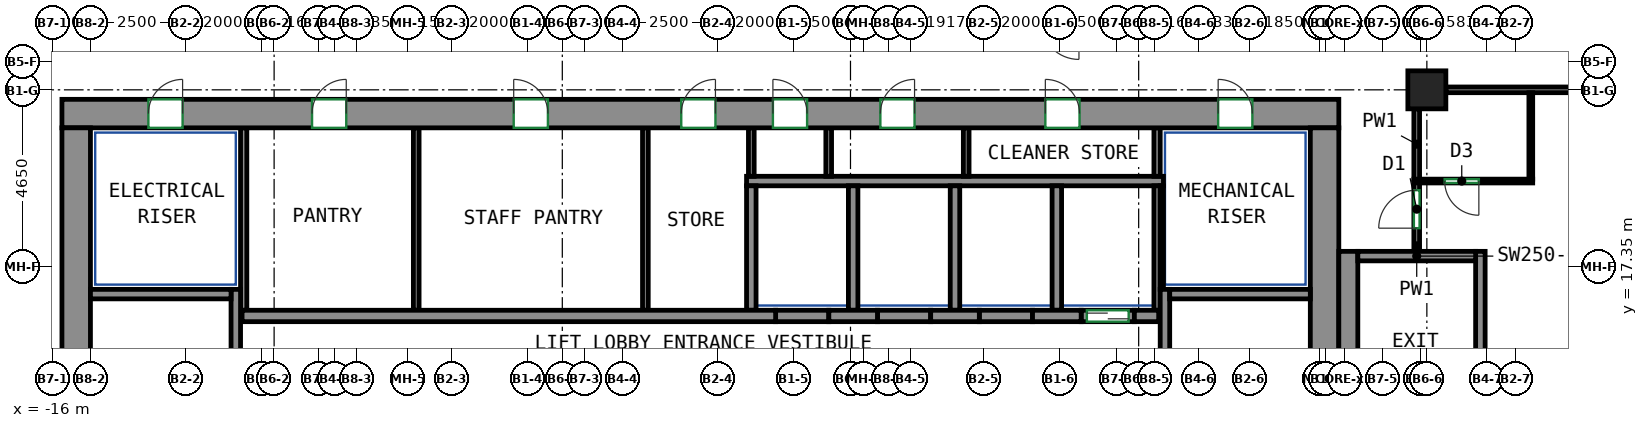
"""IFC4 building model, lengths in metres.
Left out: names, types, materials, properties, quantities, classifications, styles, units other than length and angle.
Written with IfcOpenShell. Run it as: python <this file> out.ifc"""

import sys

from ifc_helpers import new_model, si_unit, direction, frame, frame_2d, origin, origin_2d, place, context, subcontext, project, spatial, rectangle, extrude, source, transform, mapped, element, fill, save


model = new_model("IFC4")
c1 = context("Model", 3, precision=1e-05, world=origin(), true_north=direction((0.0, 1.0)))
c2 = subcontext(c1, "Body", "Model", "MODEL_VIEW")
j1 = project(units=[si_unit("LENGTHUNIT", "METRE"), si_unit("PLANEANGLEUNIT", "RADIAN")], contexts=[c1])
p1 = place(None, origin())
s1 = spatial("IfcSite", under=j1, at=p1, CompositionType="ELEMENT")
p2 = place(p1, origin())
s2 = spatial("IfcBuilding", under=s1, at=p2, CompositionType="ELEMENT")
p3 = place(p2, frame((0.0, 0.0, 213.5)))
s3 = spatial("IfcBuildingStorey", under=s2, at=p3, CompositionType="ELEMENT", Elevation=213.5)
m1 = source(origin(), c2, "Body", "SweptSolid", [
    extrude(rectangle(XDim=1.0, YDim=1.0, at=origin_2d()), origin(), (0.0, 0.0, 1.0), 3.12),
])
p4 = place(p3, frame((20.167, 22.0, 0.0), z_axis=(0.0, 0.0, 1.0), x_axis=(1.0, 0.0, 0.0)))
e1 = element("IfcColumn", 1, at=p4, inside=s3, PredefinedType="COLUMN", context=c2, shape_type="MappedRepresentation", body=[
    mapped(m1, transform((0.0, 0.0, 0.0))),
])
m2 = source(origin(), c2, "Body", "SweptSolid", [
    extrude(rectangle(XDim=33.6, YDim=0.75, at=frame_2d((16.8, 0.0))), origin(), (0.0, 0.0, 1.0), 3.12),
])
p5 = place(p3, frame((-15.75, 21.375, 0.0), z_axis=(0.0, 0.0, 1.0), x_axis=(1.0, 0.0, 0.0)))
e2 = element("IfcWall", 2, at=p5, inside=s3, PredefinedType="SHEAR", context=c2, shape_type="MappedRepresentation", body=[
    mapped(m2, transform((0.0, 0.0, 0.0))),
])
p6 = place(p5, frame((6.581, 0.0, 0.0)))
e3 = element("IfcOpeningElement", 3, at=p6, cuts=e2, PredefinedType="OPENING", context=c2, shape_type="SweptSolid", body=[
    extrude(rectangle(XDim=0.9, YDim=2.1, at=frame_2d((0.45, 1.05))), frame((0.0, 0.385, 0.0), z_axis=(0.0, -1.0, 0.0), x_axis=(1.0, 0.0, 0.0)), (0.0, 0.0, 1.0), 0.77),
])
p7 = place(p5, frame((11.888, 0.0, 0.0)))
e4 = element("IfcOpeningElement", 4, at=p7, cuts=e2, PredefinedType="OPENING", context=c2, shape_type="SweptSolid", body=[
    extrude(rectangle(XDim=0.9, YDim=2.1, at=frame_2d((0.45, 1.05))), frame((0.0, 0.385, 0.0), z_axis=(0.0, -1.0, 0.0), x_axis=(1.0, 0.0, 0.0)), (0.0, 0.0, 1.0), 0.77),
])
p8 = place(p5, frame((16.296, 0.0, 0.0)))
e5 = element("IfcOpeningElement", 5, at=p8, cuts=e2, PredefinedType="OPENING", context=c2, shape_type="SweptSolid", body=[
    extrude(rectangle(XDim=0.9, YDim=2.1, at=frame_2d((0.45, 1.05))), frame((0.0, 0.385, 0.0), z_axis=(0.0, -1.0, 0.0), x_axis=(1.0, 0.0, 0.0)), (0.0, 0.0, 1.0), 0.77),
])
p9 = place(p5, frame((18.708, 0.0, 0.0)))
e6 = element("IfcOpeningElement", 6, at=p9, cuts=e2, PredefinedType="OPENING", context=c2, shape_type="SweptSolid", body=[
    extrude(rectangle(XDim=0.9, YDim=2.1, at=frame_2d((0.45, 1.05))), frame((0.0, 0.385, 0.0), z_axis=(0.0, -1.0, 0.0), x_axis=(1.0, 0.0, 0.0)), (0.0, 0.0, 1.0), 0.77),
])
p10 = place(p5, frame((21.536, 0.0, 0.0)))
e7 = element("IfcOpeningElement", 7, at=p10, cuts=e2, PredefinedType="OPENING", context=c2, shape_type="SweptSolid", body=[
    extrude(rectangle(XDim=0.9, YDim=2.1, at=frame_2d((0.45, 1.05))), frame((0.0, 0.385, 0.0), z_axis=(0.0, -1.0, 0.0), x_axis=(1.0, 0.0, 0.0)), (0.0, 0.0, 1.0), 0.77),
])
p11 = place(p5, frame((25.877, 0.0, 0.0)))
e8 = element("IfcOpeningElement", 8, at=p11, cuts=e2, PredefinedType="OPENING", context=c2, shape_type="SweptSolid", body=[
    extrude(rectangle(XDim=0.9, YDim=2.1, at=frame_2d((0.45, 1.05))), frame((0.0, 0.385, 0.0), z_axis=(0.0, -1.0, 0.0), x_axis=(1.0, 0.0, 0.0)), (0.0, 0.0, 1.0), 0.77),
])
p12 = place(p5, frame((2.275, 0.0, 0.0)))
e9 = element("IfcOpeningElement", 9, at=p12, cuts=e2, PredefinedType="OPENING", context=c2, shape_type="SweptSolid", body=[
    extrude(rectangle(XDim=0.9, YDim=2.1, at=frame_2d((0.45, 1.05))), frame((0.0, 0.385, 0.0), z_axis=(0.0, -1.0, 0.0), x_axis=(1.0, 0.0, 0.0)), (0.0, 0.0, 1.0), 0.77),
])
p13 = place(p5, frame((30.425, 0.0, 0.0)))
e10 = element("IfcOpeningElement", 10, at=p13, cuts=e2, PredefinedType="OPENING", context=c2, shape_type="SweptSolid", body=[
    extrude(rectangle(XDim=0.9, YDim=2.1, at=frame_2d((0.45, 1.05))), frame((0.0, 0.385, 0.0), z_axis=(0.0, -1.0, 0.0), x_axis=(1.0, 0.0, 0.0)), (0.0, 0.0, 1.0), 0.77),
])
m3 = source(origin(), c2, "Body", "SweptSolid", [
    extrude(rectangle(XDim=12.0, YDim=0.75, at=frame_2d((6.0, 0.0))), origin(), (0.0, 0.0, 1.0), 3.12),
])
for number, where, z_axis, x_axis in (
    (11, (-15.375, 9.0, 0.0), (0.0, 0.0, 1.0), (0.0, 1.0, 0.0)),
    (12, (17.475, 9.0, 0.0), (0.0, 0.0, 1.0), (0.0, 1.0, 0.0)),
):
    element("IfcWall", number, at=place(p3, frame(where, z_axis=z_axis, x_axis=x_axis)), inside=s3, PredefinedType="SHEAR", context=c2, shape_type="MappedRepresentation", body=[
        mapped(m3, transform((0.0, 0.0, 0.0))),
    ])
m4 = source(origin(), c2, "Body", "SweptSolid", [
    extrude(rectangle(XDim=7.75, YDim=0.25, at=frame_2d((3.875, 0.0))), origin(), (0.0, 0.0, 1.0), 3.12),
])
p14 = place(p3, frame((-11.175, 9.0, 0.0), z_axis=(0.0, 0.0, 1.0), x_axis=(0.0, 1.0, 0.0)))
e13 = element("IfcWall", 13, at=p14, inside=s3, PredefinedType="SHEAR", context=c2, shape_type="MappedRepresentation", body=[
    mapped(m4, transform((0.0, 0.0, 0.0))),
])
m5 = source(origin(), c2, "Body", "SweptSolid", [
    extrude(rectangle(XDim=3.7, YDim=0.25, at=frame_2d((1.85, 0.0))), origin(), (0.0, 0.0, 1.0), 3.12),
])
p15 = place(p3, frame((-15.0, 16.625, 0.0), z_axis=(0.0, 0.0, 1.0), x_axis=(1.0, 0.0, 0.0)))
e14 = element("IfcWall", 14, at=p15, inside=s3, PredefinedType="SHEAR", context=c2, shape_type="MappedRepresentation", body=[
    mapped(m5, transform((0.0, 0.0, 0.0))),
])
p16 = place(p3, frame((13.275, 9.0, 0.0), z_axis=(0.0, 0.0, 1.0), x_axis=(0.0, 1.0, 0.0)))
e15 = element("IfcWall", 15, at=p16, inside=s3, PredefinedType="SHEAR", context=c2, shape_type="MappedRepresentation", body=[
    mapped(m4, transform((0.0, 0.0, 0.0))),
])
m6 = source(origin(), c2, "Body", "SweptSolid", [
    extrude(rectangle(XDim=3.7, YDim=0.25, at=frame_2d((1.85, 0.0))), origin(), (0.0, 0.0, 1.0), 3.12),
])
p17 = place(p3, frame((13.4, 16.625, 0.0), z_axis=(0.0, 0.0, 1.0), x_axis=(1.0, 0.0, 0.0)))
e16 = element("IfcWall", 16, at=p17, inside=s3, PredefinedType="SHEAR", context=c2, shape_type="MappedRepresentation", body=[
    mapped(m6, transform((0.0, 0.0, 0.0))),
])
m7 = source(origin(), c2, "Body", "SweptSolid", [
    extrude(rectangle(XDim=8.0, YDim=0.5, at=frame_2d((4.0, 0.0))), origin(), (0.0, 0.0, 1.0), 3.12),
])
p18 = place(p3, frame((18.1, 9.75, 0.0), z_axis=(0.0, 0.0, 1.0), x_axis=(0.0, 1.0, 0.0)))
e17 = element("IfcWall", 17, at=p18, inside=s3, PredefinedType="SHEAR", context=c2, shape_type="MappedRepresentation", body=[
    mapped(m7, transform((0.0, 0.0, 0.0))),
])
m8 = source(origin(), c2, "Body", "SweptSolid", [
    extrude(rectangle(XDim=8.0, YDim=0.25, at=frame_2d((4.0, 0.0))), origin(), (0.0, 0.0, 1.0), 3.12),
])
p19 = place(p3, frame((21.575, 9.75, 0.0), z_axis=(0.0, 0.0, 1.0), x_axis=(0.0, 1.0, 0.0)))
e18 = element("IfcWall", 18, at=p19, inside=s3, PredefinedType="SHEAR", context=c2, shape_type="MappedRepresentation", body=[
    mapped(m8, transform((0.0, 0.0, 0.0))),
])
m9 = source(origin(), c2, "Body", "SweptSolid", [
    extrude(rectangle(XDim=3.1, YDim=0.25, at=frame_2d((1.55, 0.0))), origin(), (0.0, 0.0, 1.0), 3.12),
])
p20 = place(p3, frame((18.35, 17.625, 0.0), z_axis=(0.0, 0.0, 1.0), x_axis=(1.0, 0.0, 0.0)))
e19 = element("IfcWall", 19, at=p20, inside=s3, PredefinedType="SHEAR", context=c2, shape_type="MappedRepresentation", body=[
    mapped(m9, transform((0.0, 0.0, 0.0))),
])
m10 = source(origin(), c2, "Body", "SweptSolid", [
    extrude(rectangle(XDim=14.04, YDim=0.3, at=frame_2d((7.02, 0.0))), origin(), (0.0, 0.0, 1.0), 3.12),
])
p21 = place(p3, frame((-11.01, 16.05, 0.0), z_axis=(0.0, 0.0, 1.0), x_axis=(1.0, 0.0, 0.0)))
e20 = element("IfcWall", 20, at=p21, inside=s3, PredefinedType="SHEAR", context=c2, shape_type="MappedRepresentation", body=[
    mapped(m10, transform((0.0, 0.0, 0.0))),
])
m11 = source(origin(), c2, "Body", "SweptSolid", [
    extrude(rectangle(XDim=1.28, YDim=0.3, at=frame_2d((0.64, 0.0))), origin(), (0.0, 0.0, 1.0), 3.12),
])
p22 = place(p3, frame((4.43, 16.05, 0.0), z_axis=(0.0, 0.0, 1.0), x_axis=(1.0, 0.0, 0.0)))
e21 = element("IfcWall", 21, at=p22, inside=s3, PredefinedType="SHEAR", context=c2, shape_type="MappedRepresentation", body=[
    mapped(m11, transform((0.0, 0.0, 0.0))),
])
m12 = source(origin(), c2, "Body", "SweptSolid", [
    extrude(rectangle(XDim=1.28, YDim=0.3, at=frame_2d((0.64, 0.0))), origin(), (0.0, 0.0, 1.0), 3.12),
])
p23 = place(p3, frame((7.11, 16.05, 0.0), z_axis=(0.0, 0.0, 1.0), x_axis=(1.0, 0.0, 0.0)))
e22 = element("IfcWall", 22, at=p23, inside=s3, PredefinedType="SHEAR", context=c2, shape_type="MappedRepresentation", body=[
    mapped(m12, transform((0.0, 0.0, 0.0))),
])
p24 = place(p3, frame((9.79, 16.05, 0.0), z_axis=(0.0, 0.0, 1.0), x_axis=(1.0, 0.0, 0.0)))
e23 = element("IfcWall", 23, at=p24, inside=s3, PredefinedType="SHEAR", context=c2, shape_type="MappedRepresentation", body=[
    mapped(m11, transform((0.0, 0.0, 0.0))),
])
m13 = source(origin(), c2, "Body", "SweptSolid", [
    extrude(rectangle(XDim=0.64, YDim=0.3, at=frame_2d((0.32, 0.0))), origin(), (0.0, 0.0, 1.0), 3.12),
])
p25 = place(p3, frame((12.47, 16.05, 0.0), z_axis=(0.0, 0.0, 1.0), x_axis=(1.0, 0.0, 0.0)))
e24 = element("IfcWall", 24, at=p25, inside=s3, PredefinedType="SHEAR", context=c2, shape_type="MappedRepresentation", body=[
    mapped(m13, transform((0.0, 0.0, 0.0))),
])
m14 = source(origin(), c2, "Body", "SweptSolid", [
    extrude(rectangle(XDim=1.4, YDim=0.3, at=frame_2d((0.7, 0.0))), origin(), (0.0, 0.0, 1.0), 3.12),
])
p26 = place(p3, frame((11.07, 16.05, 0.0), z_axis=(0.0, 0.0, 1.0), x_axis=(1.0, 0.0, 0.0)))
e25 = element("IfcWall", 25, at=p26, inside=s3, PredefinedType="PARTITIONING", context=c2, shape_type="MappedRepresentation", body=[
    mapped(m14, transform((0.0, 0.0, 0.0))),
])
p27 = place(p26, frame((0.15, 0.0, 0.0)))
e26 = element("IfcOpeningElement", 26, at=p27, cuts=e25, PredefinedType="OPENING", context=c2, shape_type="SweptSolid", body=[
    extrude(rectangle(XDim=1.1, YDim=2.1, at=frame_2d((0.55, 1.05))), frame((0.0, 0.16, 0.0), z_axis=(0.0, -1.0, 0.0), x_axis=(1.0, 0.0, 0.0)), (0.0, 0.0, 1.0), 0.32),
])
p28 = place(p3, frame((3.03, 16.05, 0.0), z_axis=(0.0, 0.0, 1.0), x_axis=(1.0, 0.0, 0.0)))
e27 = element("IfcWall", 27, at=p28, inside=s3, PredefinedType="PARTITIONING", context=c2, shape_type="MappedRepresentation", body=[
    mapped(m14, transform((0.0, 0.0, 0.0))),
])
m15 = source(origin(), c2, "Body", "SweptSolid", [
    extrude(rectangle(XDim=1.4, YDim=0.3, at=frame_2d((0.7, 0.0))), origin(), (0.0, 0.0, 1.0), 3.12),
])
for number, where, z_axis, x_axis in (
    (28, (5.71, 16.05, 0.0), (0.0, 0.0, 1.0), (1.0, 0.0, 0.0)),
    (29, (8.39, 16.05, 0.0), (0.0, 0.0, 1.0), (1.0, 0.0, 0.0)),
):
    element("IfcWall", number, at=place(p3, frame(where, z_axis=z_axis, x_axis=x_axis)), inside=s3, PredefinedType="PARTITIONING", context=c2, shape_type="MappedRepresentation", body=[
        mapped(m15, transform((0.0, 0.0, 0.0))),
    ])
m16 = source(origin(), c2, "Body", "SweptSolid", [
    extrude(rectangle(XDim=10.97, YDim=0.25, at=frame_2d((5.485, 0.0))), origin(), (0.0, 0.0, 1.0), 3.12),
])
p29 = place(p3, frame((2.265, 19.6, 0.0), z_axis=(0.0, 0.0, 1.0), x_axis=(1.0, 0.0, 0.0)))
e30 = element("IfcWall", 30, at=p29, inside=s3, PredefinedType="PARTITIONING", context=c2, shape_type="MappedRepresentation", body=[
    mapped(m16, transform((0.0, 0.0, 0.0))),
])
m17 = source(origin(), c2, "Body", "SweptSolid", [
    extrude(rectangle(XDim=3.275, YDim=0.165, at=frame_2d((1.638, 0.0))), origin(), (0.0, 0.0, 1.0), 3.12),
])
p30 = place(p3, frame((13.067, 16.2, 0.0), z_axis=(0.0, 0.0, 1.0), x_axis=(0.0, 1.0, 0.0)))
e31 = element("IfcWall", 31, at=p30, inside=s3, PredefinedType="PARTITIONING", context=c2, shape_type="MappedRepresentation", body=[
    mapped(m17, transform((0.0, 0.0, 0.0))),
])
m18 = source(origin(), c2, "Body", "SweptSolid", [
    extrude(rectangle(XDim=1.275, YDim=0.165, at=frame_2d((0.637, 0.0))), origin(), (0.0, 0.0, 1.0), 3.12),
])
p31 = place(p3, frame((13.067, 19.725, 0.0), z_axis=(0.0, 0.0, 1.0), x_axis=(0.0, 1.0, 0.0)))
e32 = element("IfcWall", 32, at=p31, inside=s3, PredefinedType="PARTITIONING", context=c2, shape_type="MappedRepresentation", body=[
    mapped(m18, transform((0.0, 0.0, 0.0))),
])
m19 = source(origin(), c2, "Body", "SweptSolid", [
    extrude(rectangle(XDim=4.8, YDim=0.165, at=frame_2d((2.4, 0.0))), origin(), (0.0, 0.0, 1.0), 3.12),
])
p32 = place(p3, frame((-10.968, 16.2, 0.0), z_axis=(0.0, 0.0, 1.0), x_axis=(0.0, 1.0, 0.0)))
e33 = element("IfcWall", 33, at=p32, inside=s3, PredefinedType="PARTITIONING", context=c2, shape_type="MappedRepresentation", body=[
    mapped(m19, transform((0.0, 0.0, 0.0))),
])
m20 = source(origin(), c2, "Body", "SweptSolid", [
    extrude(rectangle(XDim=3.275, YDim=0.25, at=frame_2d((1.638, 0.0))), origin(), (0.0, 0.0, 1.0), 3.12),
])
p33 = place(p3, frame((10.43, 16.2, 0.0), z_axis=(0.0, 0.0, 1.0), x_axis=(0.0, 1.0, 0.0)))
e34 = element("IfcWall", 34, at=p33, inside=s3, PredefinedType="PARTITIONING", context=c2, shape_type="MappedRepresentation", body=[
    mapped(m20, transform((0.0, 0.0, 0.0))),
])
m21 = source(origin(), c2, "Body", "SweptSolid", [
    extrude(rectangle(XDim=2.725, YDim=0.085, at=frame_2d((1.363, 0.0))), origin(), (0.0, 0.0, 1.0), 3.12),
])
p34 = place(p3, frame((13.192, 16.75, 0.0), z_axis=(0.0, 0.0, 1.0), x_axis=(0.0, 1.0, 0.0)))
e35 = element("IfcWall", 35, at=p34, inside=s3, PredefinedType="PARTITIONING", context=c2, shape_type="MappedRepresentation", body=[
    mapped(m21, transform((0.0, 0.0, 0.0))),
])
for number, where, z_axis, x_axis in (
    (36, (2.39, 16.2, 0.0), (0.0, 0.0, 1.0), (0.0, 1.0, 0.0)),
    (37, (5.07, 16.2, 0.0), (0.0, 0.0, 1.0), (0.0, 1.0, 0.0)),
    (38, (7.75, 16.2, 0.0), (0.0, 0.0, 1.0), (0.0, 1.0, 0.0)),
):
    element("IfcWall", number, at=place(p3, frame(where, z_axis=z_axis, x_axis=x_axis)), inside=s3, PredefinedType="PARTITIONING", context=c2, shape_type="MappedRepresentation", body=[
        mapped(m20, transform((0.0, 0.0, 0.0))),
    ])
m22 = source(origin(), c2, "Body", "SweptSolid", [
    extrude(rectangle(XDim=4.8, YDim=0.15, at=frame_2d((2.4, 0.0))), origin(), (0.0, 0.0, 1.0), 3.12),
])
for number, where, z_axis, x_axis in (
    (39, (-6.427, 16.2, 0.0), (0.0, 0.0, 1.0), (0.0, 1.0, 0.0)),
    (40, (-0.397, 16.2, 0.0), (0.0, 0.0, 1.0), (0.0, 1.0, 0.0)),
):
    element("IfcWall", number, at=place(p3, frame(where, z_axis=z_axis, x_axis=x_axis)), inside=s3, PredefinedType="PARTITIONING", context=c2, shape_type="MappedRepresentation", body=[
        mapped(m22, transform((0.0, 0.0, 0.0))),
    ])
m23 = source(origin(), c2, "Body", "SweptSolid", [
    extrude(rectangle(XDim=1.275, YDim=0.15, at=frame_2d((0.637, 0.0))), origin(), (0.0, 0.0, 1.0), 3.12),
])
for number, where, z_axis, x_axis in (
    (41, (2.39, 19.725, 0.0), (0.0, 0.0, 1.0), (0.0, 1.0, 0.0)),
    (42, (4.427, 19.725, 0.0), (0.0, 0.0, 1.0), (0.0, 1.0, 0.0)),
    (43, (8.045, 19.725, 0.0), (0.0, 0.0, 1.0), (0.0, 1.0, 0.0)),
):
    element("IfcWall", number, at=place(p3, frame(where, z_axis=z_axis, x_axis=x_axis)), inside=s3, PredefinedType="PARTITIONING", context=c2, shape_type="MappedRepresentation", body=[
        mapped(m23, transform((0.0, 0.0, 0.0))),
    ])
p35 = place(p3, frame((19.9, 17.75, 0.0), z_axis=(0.0, 0.0, 1.0), x_axis=(0.0, 1.0, 0.0)))
e44 = element("IfcWall", 44, at=p35, inside=s3, PredefinedType="PARTITIONING", context=c2, shape_type="SweptSolid", body=[
    extrude(rectangle(XDim=1.81, YDim=0.15, at=frame_2d((0.905, 0.0))), origin(), (0.0, 0.0, 1.0), 3.12),
])
p36 = place(p35, frame((0.61, 0.0, 0.0)))
e45 = element("IfcOpeningElement", 45, at=p36, cuts=e44, PredefinedType="OPENING", context=c2, shape_type="SweptSolid", body=[
    extrude(rectangle(XDim=1.0, YDim=2.1, at=frame_2d((0.5, 1.05))), frame((0.0, 0.085, 0.0), z_axis=(0.0, -1.0, 0.0), x_axis=(1.0, 0.0, 0.0)), (0.0, 0.0, 1.0), 0.17),
])
p37 = place(p3, frame((20.667, 22.0, 0.0), z_axis=(0.0, 0.0, 1.0), x_axis=(1.0, 0.0, 0.0)))
e46 = element("IfcWall", 46, at=p37, inside=s3, PredefinedType="PARTITIONING", context=c2, shape_type="SweptSolid", body=[
    extrude(rectangle(XDim=7.158, YDim=0.15, at=frame_2d((3.579, 0.0))), origin(), (0.0, 0.0, 1.0), 3.12),
])
p38 = place(p3, frame((19.9, 19.64, 0.0), z_axis=(0.0, 0.0, 1.0), x_axis=(0.0, 1.0, 0.0)))
e47 = element("IfcWall", 47, at=p38, inside=s3, PredefinedType="PARTITIONING", context=c2, shape_type="SweptSolid", body=[
    extrude(rectangle(XDim=1.86, YDim=0.15, at=frame_2d((0.93, 0.0))), origin(), (0.0, 0.0, 1.0), 3.12),
])
p39 = place(p3, frame((22.952, 19.6, 0.0), z_axis=(0.0, 0.0, 1.0), x_axis=(-1.0, 0.0, 0.0)))
e48 = element("IfcWall", 48, at=p39, inside=s3, PredefinedType="PARTITIONING", context=c2, shape_type="SweptSolid", body=[
    extrude(rectangle(XDim=3.125, YDim=0.1, at=frame_2d((1.562, 0.0))), origin(), (0.0, 0.0, 1.0), 3.12),
])
p40 = place(p39, frame((1.417, 0.0, 0.0)))
e49 = element("IfcOpeningElement", 49, at=p40, cuts=e48, PredefinedType="OPENING", context=c2, shape_type="SweptSolid", body=[
    extrude(rectangle(XDim=0.9, YDim=2.1, at=frame_2d((0.45, 1.05))), frame((0.0, 0.06, 0.0), z_axis=(0.0, -1.0, 0.0), x_axis=(1.0, 0.0, 0.0)), (0.0, 0.0, 1.0), 0.12),
])
p41 = place(p3, frame((22.902, 19.65, 0.0), z_axis=(0.0, 0.0, 1.0), x_axis=(0.0, 1.0, 0.0)))
e50 = element("IfcWall", 50, at=p41, inside=s3, PredefinedType="PARTITIONING", context=c2, shape_type="SweptSolid", body=[
    extrude(rectangle(XDim=2.273, YDim=0.1, at=frame_2d((1.137, 0.0))), origin(), (0.0, 0.0, 1.0), 3.12),
])
p42 = place(p27, origin())
e51 = element("IfcDoor", 51, at=p42, inside=s3, OperationType="DOUBLE_DOOR_SLIDING", PredefinedType="DOOR", context=c2, shape_type="SweptSolid", body=[
    extrude(rectangle(XDim=1.1, YDim=2.1, at=frame_2d((0.55, 1.05))), frame((0.0, 0.025, 0.0), z_axis=(0.0, -1.0, 0.0), x_axis=(1.0, 0.0, 0.0)), (0.0, 0.0, 1.0), 0.05),
])
fill(e26, e51)
p43 = place(p6, origin())
e52 = element("IfcDoor", 52, at=p43, inside=s3, OperationType="SINGLE_SWING_RIGHT", PredefinedType="DOOR", context=c2, shape_type="SweptSolid", body=[
    extrude(rectangle(XDim=0.9, YDim=2.1, at=frame_2d((0.45, 1.05))), frame((0.0, -0.23, 0.0), z_axis=(0.0, -1.0, 0.0), x_axis=(1.0, 0.0, 0.0)), (0.0, 0.0, 1.0), 0.05),
])
fill(e3, e52)
p44 = place(p7, origin())
e53 = element("IfcDoor", 53, at=p44, inside=s3, OperationType="SINGLE_SWING_LEFT", PredefinedType="DOOR", context=c2, shape_type="SweptSolid", body=[
    extrude(rectangle(XDim=0.9, YDim=2.1, at=frame_2d((0.45, 1.05))), frame((0.0, -0.23, 0.0), z_axis=(0.0, -1.0, 0.0), x_axis=(1.0, 0.0, 0.0)), (0.0, 0.0, 1.0), 0.05),
])
fill(e4, e53)
p45 = place(p8, origin())
e54 = element("IfcDoor", 54, at=p45, inside=s3, OperationType="SINGLE_SWING_RIGHT", PredefinedType="DOOR", context=c2, shape_type="SweptSolid", body=[
    extrude(rectangle(XDim=0.9, YDim=2.1, at=frame_2d((0.45, 1.05))), frame((0.0, -0.23, 0.0), z_axis=(0.0, -1.0, 0.0), x_axis=(1.0, 0.0, 0.0)), (0.0, 0.0, 1.0), 0.05),
])
fill(e5, e54)
p46 = place(p9, origin())
e55 = element("IfcDoor", 55, at=p46, inside=s3, OperationType="SINGLE_SWING_LEFT", PredefinedType="DOOR", context=c2, shape_type="SweptSolid", body=[
    extrude(rectangle(XDim=0.9, YDim=2.1, at=frame_2d((0.45, 1.05))), frame((0.0, -0.23, 0.0), z_axis=(0.0, -1.0, 0.0), x_axis=(1.0, 0.0, 0.0)), (0.0, 0.0, 1.0), 0.05),
])
fill(e6, e55)
p47 = place(p10, origin())
e56 = element("IfcDoor", 56, at=p47, inside=s3, OperationType="SINGLE_SWING_RIGHT", PredefinedType="DOOR", context=c2, shape_type="SweptSolid", body=[
    extrude(rectangle(XDim=0.9, YDim=2.1, at=frame_2d((0.45, 1.05))), frame((0.0, -0.23, 0.0), z_axis=(0.0, -1.0, 0.0), x_axis=(1.0, 0.0, 0.0)), (0.0, 0.0, 1.0), 0.05),
])
fill(e7, e56)
p48 = place(p11, origin())
e57 = element("IfcDoor", 57, at=p48, inside=s3, OperationType="SINGLE_SWING_LEFT", PredefinedType="DOOR", context=c2, shape_type="SweptSolid", body=[
    extrude(rectangle(XDim=0.9, YDim=2.1, at=frame_2d((0.45, 1.05))), frame((0.0, -0.23, 0.0), z_axis=(0.0, -1.0, 0.0), x_axis=(1.0, 0.0, 0.0)), (0.0, 0.0, 1.0), 0.05),
])
fill(e8, e57)
p49 = place(p12, origin())
e58 = element("IfcDoor", 58, at=p49, inside=s3, OperationType="SINGLE_SWING_RIGHT", PredefinedType="DOOR", context=c2, shape_type="SweptSolid", body=[
    extrude(rectangle(XDim=0.9, YDim=2.1, at=frame_2d((0.45, 1.05))), frame((0.0, -0.23, 0.0), z_axis=(0.0, -1.0, 0.0), x_axis=(1.0, 0.0, 0.0)), (0.0, 0.0, 1.0), 0.05),
])
fill(e9, e58)
p50 = place(p13, origin())
e59 = element("IfcDoor", 59, at=p50, inside=s3, OperationType="SINGLE_SWING_LEFT", PredefinedType="DOOR", context=c2, shape_type="SweptSolid", body=[
    extrude(rectangle(XDim=0.9, YDim=2.1, at=frame_2d((0.45, 1.05))), frame((0.0, -0.23, 0.0), z_axis=(0.0, -1.0, 0.0), x_axis=(1.0, 0.0, 0.0)), (0.0, 0.0, 1.0), 0.05),
])
fill(e10, e59)
p51 = place(p36, origin())
e60 = element("IfcDoor", 60, at=p51, inside=s3, OperationType="SINGLE_SWING_LEFT", PredefinedType="DOOR", context=c2, shape_type="SweptSolid", body=[
    extrude(rectangle(XDim=1.0, YDim=2.1, at=frame_2d((0.5, 1.05))), frame((0.0, 0.025, 0.0), z_axis=(0.0, -1.0, 0.0), x_axis=(1.0, 0.0, 0.0)), (0.0, 0.0, 1.0), 0.05),
])
fill(e45, e60)
p52 = place(p40, origin())
e61 = element("IfcDoor", 61, at=p52, inside=s3, OperationType="SINGLE_SWING_LEFT", PredefinedType="DOOR", context=c2, shape_type="SweptSolid", body=[
    extrude(rectangle(XDim=0.9, YDim=2.1, at=frame_2d((0.45, 1.05))), frame((0.0, 0.025, 0.0), z_axis=(0.0, -1.0, 0.0), x_axis=(1.0, 0.0, 0.0)), (0.0, 0.0, 1.0), 0.05),
])
fill(e49, e61)
save(model, sys.argv[1])
